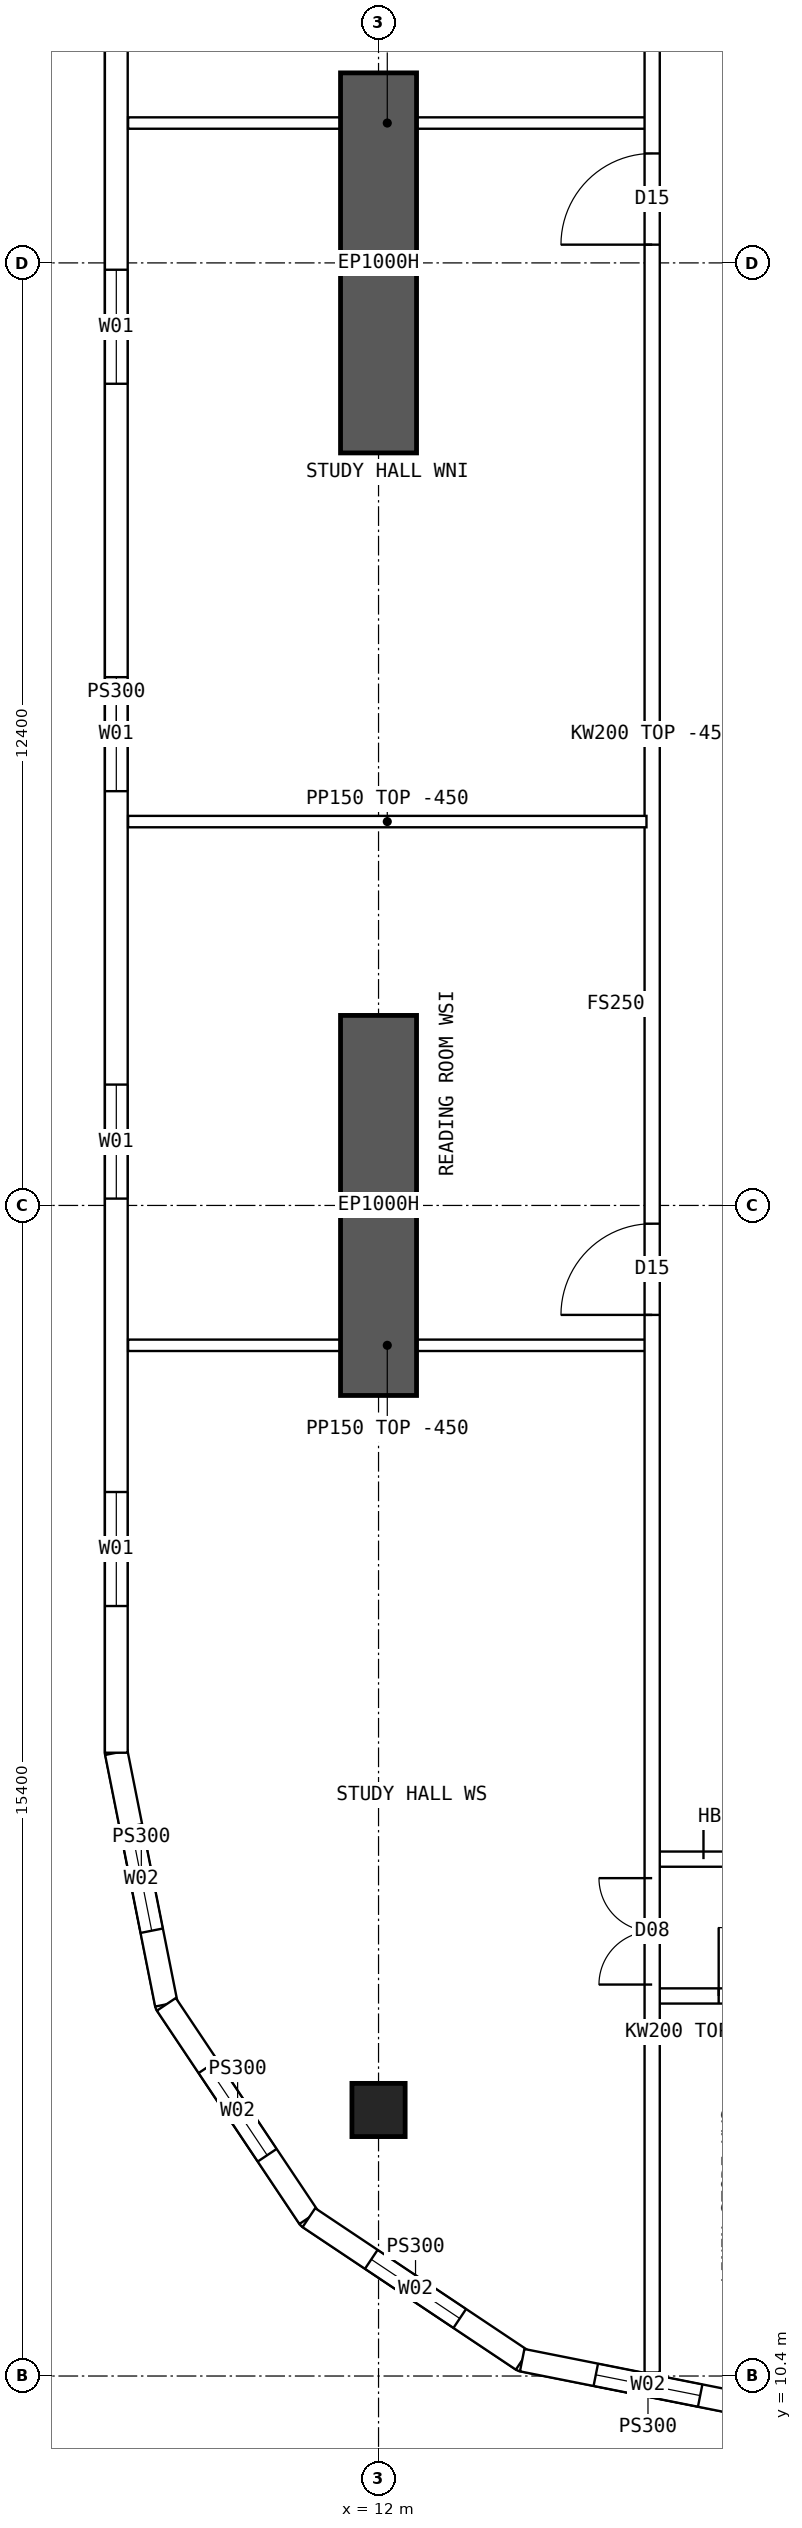
"""IFC4 building model, lengths in metres.
Left out: names, types, materials, properties, quantities, classifications, styles, units other than length and angle.
Written with IfcOpenShell. Run it as: python <this file> out.ifc"""

import sys

from ifc_helpers import new_model, si_unit, direction, frame, frame_2d, origin, origin_2d, place, context, subcontext, project, spatial, polyline, rectangle, hollow_rectangle, outline, extrude, element, fill, save


model = new_model("IFC4")
c1 = context("Model", 3, precision=1e-05, world=origin(), true_north=direction((0.0, 1.0)))
c2 = subcontext(c1, "Body", "Model", "MODEL_VIEW")
j1 = project(units=[si_unit("LENGTHUNIT", "METRE"), si_unit("PLANEANGLEUNIT", "RADIAN")], contexts=[c1])
p1 = place(None, origin())
s1 = spatial("IfcSite", under=j1, at=p1, CompositionType="ELEMENT")
p2 = place(p1, origin())
s2 = spatial("IfcBuilding", under=s1, at=p2, CompositionType="ELEMENT")
p3 = place(p2, frame((0.0, 0.0, 159.85)))
s3 = spatial("IfcBuildingStorey", under=s2, at=p3, CompositionType="ELEMENT", Elevation=159.85)
p4 = place(p3, frame((12.0, 13.9, 0.0), z_axis=(0.0, 0.0, 1.0), x_axis=(1.0, 0.0, 0.0)))
e1 = element("IfcColumn", 1, at=p4, inside=s3, PredefinedType="COLUMN", context=c2, shape_type="SweptSolid", body=[
    extrude(hollow_rectangle(XDim=0.7, YDim=0.7, WallThickness=0.07, at=origin_2d()), origin(), (0.0, 0.0, 1.0), 3.75),
])
for number, where, z_axis, x_axis in (
    (2, (12.0, 23.3, 0.0), (0.0, 0.0, 1.0), (0.0, 1.0, 0.0)),
    (3, (12.0, 35.7, 0.0), (0.0, 0.0, 1.0), (0.0, 1.0, 0.0)),
):
    element("IfcWall", number, at=place(p3, frame(where, z_axis=z_axis, x_axis=x_axis)), inside=s3, PredefinedType="SHEAR", context=c2, shape_type="SweptSolid", body=[
        extrude(rectangle(XDim=5.0, YDim=1.0, at=frame_2d((2.5, 0.0))), origin(), (0.0, 0.0, 1.0), 3.75),
    ])
p5 = place(p3, frame((8.55, 45.4, 0.0), z_axis=(0.0, 0.0, 1.0), x_axis=(0.0, -1.0, 0.0)))
e4 = element("IfcWall", 4, at=p5, inside=s3, PredefinedType="SOLIDWALL", context=c2, shape_type="SweptSolid", body=[
    extrude(outline(polyline([(-0.015, -0.15), (26.815, -0.15), (26.785, 0.15), (0.015, 0.15), (-0.015, -0.15)])), origin(), (0.0, 0.0, 1.0), 3.3),
])
p6 = place(p5, frame((1.93, 0.0, 0.9)))
e5 = element("IfcOpeningElement", 5, at=p6, cuts=e4, PredefinedType="OPENING", context=c2, shape_type="SweptSolid", body=[
    extrude(rectangle(XDim=1.5, YDim=2.0, at=frame_2d((0.75, 1.0))), frame((0.0, 0.16, 0.0), z_axis=(0.0, -1.0, 0.0), x_axis=(1.0, 0.0, 0.0)), (0.0, 0.0, 1.0), 0.32),
])
p7 = place(p5, frame((7.29, 0.0, 0.9)))
e6 = element("IfcOpeningElement", 6, at=p7, cuts=e4, PredefinedType="OPENING", context=c2, shape_type="SweptSolid", body=[
    extrude(rectangle(XDim=1.5, YDim=2.0, at=frame_2d((0.75, 1.0))), frame((0.0, 0.16, 0.0), z_axis=(0.0, -1.0, 0.0), x_axis=(1.0, 0.0, 0.0)), (0.0, 0.0, 1.0), 0.32),
])
p8 = place(p5, frame((12.65, 0.0, 0.9)))
e7 = element("IfcOpeningElement", 7, at=p8, cuts=e4, PredefinedType="OPENING", context=c2, shape_type="SweptSolid", body=[
    extrude(rectangle(XDim=1.5, YDim=2.0, at=frame_2d((0.75, 1.0))), frame((0.0, 0.16, 0.0), z_axis=(0.0, -1.0, 0.0), x_axis=(1.0, 0.0, 0.0)), (0.0, 0.0, 1.0), 0.32),
])
p9 = place(p5, frame((18.01, 0.0, 0.9)))
e8 = element("IfcOpeningElement", 8, at=p9, cuts=e4, PredefinedType="OPENING", context=c2, shape_type="SweptSolid", body=[
    extrude(rectangle(XDim=1.5, YDim=2.0, at=frame_2d((0.75, 1.0))), frame((0.0, 0.16, 0.0), z_axis=(0.0, -1.0, 0.0), x_axis=(1.0, 0.0, 0.0)), (0.0, 0.0, 1.0), 0.32),
])
p10 = place(p5, frame((23.37, 0.0, 0.9)))
e9 = element("IfcOpeningElement", 9, at=p10, cuts=e4, PredefinedType="OPENING", context=c2, shape_type="SweptSolid", body=[
    extrude(rectangle(XDim=1.5, YDim=2.0, at=frame_2d((0.75, 1.0))), frame((0.0, 0.16, 0.0), z_axis=(0.0, -1.0, 0.0), x_axis=(1.0, 0.0, 0.0)), (0.0, 0.0, 1.0), 0.32),
])
p11 = place(p3, frame((8.55, 18.6, 0.0), z_axis=(0.0, 0.0, 1.0), x_axis=(0.19508664885, -0.980786011034, 0.0)))
e10 = element("IfcWall", 10, at=p11, inside=s3, PredefinedType="SOLIDWALL", context=c2, shape_type="SweptSolid", body=[
    extrude(outline(polyline([(-0.015, -0.15), (3.405, -0.15), (3.345, 0.15), (0.015, 0.15), (-0.015, -0.15)])), origin(), (0.0, 0.0, 1.0), 3.3),
])
p12 = place(p11, frame((0.988, 0.0, 0.9)))
e11 = element("IfcOpeningElement", 11, at=p12, cuts=e10, PredefinedType="OPENING", context=c2, shape_type="SweptSolid", body=[
    extrude(rectangle(XDim=1.4, YDim=1.8, at=frame_2d((0.7, 0.9))), frame((0.0, 0.16, 0.0), z_axis=(0.0, -1.0, 0.0), x_axis=(1.0, 0.0, 0.0)), (0.0, 0.0, 1.0), 0.32),
])
p13 = place(p3, frame((9.208, 15.29, 0.0), z_axis=(0.0, 0.0, 1.0), x_axis=(0.555534554399, -0.831493450887, 0.0)))
e12 = element("IfcWall", 12, at=p13, inside=s3, PredefinedType="SOLIDWALL", context=c2, shape_type="SweptSolid", body=[
    extrude(outline(polyline([(-0.03, -0.15), (3.405, -0.15), (3.345, 0.15), (0.03, 0.15), (-0.03, -0.15)])), origin(), (0.0, 0.0, 1.0), 3.3),
])
p14 = place(p13, frame((0.988, 0.0, 0.9)))
e13 = element("IfcOpeningElement", 13, at=p14, cuts=e12, PredefinedType="OPENING", context=c2, shape_type="SweptSolid", body=[
    extrude(rectangle(XDim=1.4, YDim=1.8, at=frame_2d((0.7, 0.9))), frame((0.0, 0.16, 0.0), z_axis=(0.0, -1.0, 0.0), x_axis=(1.0, 0.0, 0.0)), (0.0, 0.0, 1.0), 0.32),
])
p15 = place(p3, frame((11.083, 12.483, 0.0), z_axis=(0.0, 0.0, 1.0), x_axis=(0.831493450887, -0.555534554399, 0.0)))
e14 = element("IfcWall", 14, at=p15, inside=s3, PredefinedType="SOLIDWALL", context=c2, shape_type="SweptSolid", body=[
    extrude(outline(polyline([(-0.03, -0.15), (3.405, -0.15), (3.345, 0.15), (0.03, 0.15), (-0.03, -0.15)])), origin(), (0.0, 0.0, 1.0), 3.3),
])
p16 = place(p15, frame((0.988, 0.0, 0.9)))
e15 = element("IfcOpeningElement", 15, at=p16, cuts=e14, PredefinedType="OPENING", context=c2, shape_type="SweptSolid", body=[
    extrude(rectangle(XDim=1.4, YDim=1.8, at=frame_2d((0.7, 0.9))), frame((0.0, 0.16, 0.0), z_axis=(0.0, -1.0, 0.0), x_axis=(1.0, 0.0, 0.0)), (0.0, 0.0, 1.0), 0.32),
])
p17 = place(p3, frame((13.89, 10.608, 0.0), z_axis=(0.0, 0.0, 1.0), x_axis=(0.98078325777, -0.195100490205, 0.0)))
e16 = element("IfcWall", 16, at=p17, inside=s3, PredefinedType="SOLIDWALL", context=c2, shape_type="SweptSolid", body=[
    extrude(outline(polyline([(-0.03, -0.15), (3.405, -0.15), (3.345, 0.15), (0.03, 0.15), (-0.03, -0.15)])), origin(), (0.0, 0.0, 1.0), 3.3),
])
p18 = place(p17, frame((0.988, 0.0, 0.9)))
e17 = element("IfcOpeningElement", 17, at=p18, cuts=e16, PredefinedType="OPENING", context=c2, shape_type="SweptSolid", body=[
    extrude(rectangle(XDim=1.4, YDim=1.8, at=frame_2d((0.7, 0.9))), frame((0.0, 0.16, 0.0), z_axis=(0.0, -1.0, 0.0), x_axis=(1.0, 0.0, 0.0)), (0.0, 0.0, 1.0), 0.32),
])
p19 = place(p3, frame((15.6, 15.4, 0.0), z_axis=(0.0, 0.0, 1.0), x_axis=(1.0, 0.0, 0.0)))
e18 = element("IfcWall", 18, at=p19, inside=s3, PredefinedType="SOLIDWALL", context=c2, shape_type="SweptSolid", body=[
    extrude(rectangle(XDim=1.975, YDim=0.2, at=frame_2d((0.987, 0.0))), origin(), (0.0, 0.0, 1.0), 3.3),
])
p20 = place(p19, frame((0.875, 0.0, 0.0)))
e19 = element("IfcOpeningElement", 19, at=p20, cuts=e18, PredefinedType="OPENING", context=c2, shape_type="SweptSolid", body=[
    extrude(rectangle(XDim=0.9, YDim=2.1, at=frame_2d((0.45, 1.05))), frame((0.0, 0.11, 0.0), z_axis=(0.0, -1.0, 0.0), x_axis=(1.0, 0.0, 0.0)), (0.0, 0.0, 1.0), 0.22),
])
p21 = place(p3, frame((15.6, 17.2, 0.0), z_axis=(0.0, 0.0, 1.0), x_axis=(1.0, 0.0, 0.0)))
e20 = element("IfcWall", 20, at=p21, inside=s3, PredefinedType="SOLIDWALL", context=c2, shape_type="SweptSolid", body=[
    extrude(rectangle(XDim=1.975, YDim=0.2, at=frame_2d((0.987, 0.0))), origin(), (0.0, 0.0, 1.0), 3.3),
])
p22 = place(p21, frame((0.675, 0.0, 0.0)))
e21 = element("IfcOpeningElement", 21, at=p22, cuts=e20, PredefinedType="OPENING", context=c2, shape_type="SweptSolid", body=[
    extrude(rectangle(XDim=1.2, YDim=2.1, at=frame_2d((0.6, 1.05))), frame((0.0, 0.11, 0.0), z_axis=(0.0, -1.0, 0.0), x_axis=(1.0, 0.0, 0.0)), (0.0, 0.0, 1.0), 0.22),
])
p23 = place(p3, frame((8.705, 30.85, 0.0), z_axis=(0.0, 0.0, 1.0), x_axis=(1.0, 0.0, 0.0)))
e22 = element("IfcWall", 22, at=p23, inside=s3, PredefinedType="PARTITIONING", context=c2, shape_type="SweptSolid", body=[
    extrude(outline(polyline([(0.0, 0.0), (6.82, 0.0), (6.82, 3.3), (3.597, 3.3), (3.595, 2.85), (2.997, 2.85), (2.995, 3.3), (0.0, 3.3), (0.0, 0.0)])), frame((0.0, 0.075, 0.0), z_axis=(0.0, -1.0, 0.0), x_axis=(1.0, 0.0, 0.0)), (0.0, 0.0, 1.0), 0.15),
])
p24 = place(p3, frame((15.6, 10.446, 0.0), z_axis=(0.0, 0.0, 1.0), x_axis=(0.0, 1.0, 0.0)))
e23 = element("IfcWall", 23, at=p24, inside=s3, PredefinedType="SOLIDWALL", context=c2, shape_type="SweptSolid", body=[
    extrude(rectangle(XDim=43.107, YDim=0.2, at=frame_2d((21.554, 0.0))), origin(), (0.0, 0.0, 1.0), 3.3),
])
p25 = place(p24, frame((13.914, 0.0, 0.0)))
e24 = element("IfcOpeningElement", 24, at=p25, cuts=e23, PredefinedType="OPENING", context=c2, shape_type="SweptSolid", body=[
    extrude(rectangle(XDim=1.2, YDim=2.1, at=frame_2d((0.6, 1.05))), frame((0.0, 0.11, 0.0), z_axis=(0.0, -1.0, 0.0), x_axis=(1.0, 0.0, 0.0)), (0.0, 0.0, 1.0), 0.22),
])
p26 = place(p24, frame((27.994, 0.0, 0.0)))
e25 = element("IfcOpeningElement", 25, at=p26, cuts=e23, PredefinedType="OPENING", context=c2, shape_type="SweptSolid", body=[
    extrude(rectangle(XDim=1.2, YDim=2.1, at=frame_2d((0.6, 1.05))), frame((0.0, 0.11, 0.0), z_axis=(0.0, -1.0, 0.0), x_axis=(1.0, 0.0, 0.0)), (0.0, 0.0, 1.0), 0.22),
])
p27 = place(p24, frame((5.104, 0.0, 0.0)))
e26 = element("IfcOpeningElement", 26, at=p27, cuts=e23, PredefinedType="OPENING", context=c2, shape_type="SweptSolid", body=[
    extrude(rectangle(XDim=1.4, YDim=2.1, at=frame_2d((0.7, 1.05))), frame((0.0, 0.11, 0.0), z_axis=(0.0, -1.0, 0.0), x_axis=(1.0, 0.0, 0.0)), (0.0, 0.0, 1.0), 0.22),
])
p28 = place(p24, frame((36.504, 0.0, 0.0)))
e27 = element("IfcOpeningElement", 27, at=p28, cuts=e23, PredefinedType="OPENING", context=c2, shape_type="SweptSolid", body=[
    extrude(rectangle(XDim=1.4, YDim=2.1, at=frame_2d((0.7, 1.05))), frame((0.0, 0.11, 0.0), z_axis=(0.0, -1.0, 0.0), x_axis=(1.0, 0.0, 0.0)), (0.0, 0.0, 1.0), 0.22),
])
for number, where, z_axis, x_axis in (
    (28, (8.705, 23.96, 0.0), (0.0, 0.0, 1.0), (1.0, 0.0, 0.0)),
    (29, (8.705, 40.04, 0.0), (0.0, 0.0, 1.0), (1.0, 0.0, 0.0)),
):
    element("IfcWall", number, at=place(p3, frame(where, z_axis=z_axis, x_axis=x_axis)), inside=s3, PredefinedType="PARTITIONING", context=c2, shape_type="SweptSolid", body=[
        extrude(rectangle(XDim=6.82, YDim=0.15, at=frame_2d((3.41, 0.0))), origin(), (0.0, 0.0, 1.0), 3.3),
    ])
p29 = place(p7, origin())
e30 = element("IfcWindow", 30, at=p29, inside=s3, PartitioningType="SINGLE_PANEL", PredefinedType="WINDOW", context=c2, shape_type="SweptSolid", body=[
    extrude(rectangle(XDim=1.5, YDim=2.0, at=frame_2d((0.75, 1.0))), frame((0.0, 0.03, 0.0), z_axis=(0.0, -1.0, 0.0), x_axis=(1.0, 0.0, 0.0)), (0.0, 0.0, 1.0), 0.06),
])
fill(e6, e30)
p30 = place(p8, origin())
e31 = element("IfcWindow", 31, at=p30, inside=s3, PartitioningType="SINGLE_PANEL", PredefinedType="WINDOW", context=c2, shape_type="SweptSolid", body=[
    extrude(rectangle(XDim=1.5, YDim=2.0, at=frame_2d((0.75, 1.0))), frame((0.0, 0.03, 0.0), z_axis=(0.0, -1.0, 0.0), x_axis=(1.0, 0.0, 0.0)), (0.0, 0.0, 1.0), 0.06),
])
fill(e7, e31)
p31 = place(p9, origin())
e32 = element("IfcWindow", 32, at=p31, inside=s3, PartitioningType="SINGLE_PANEL", PredefinedType="WINDOW", context=c2, shape_type="SweptSolid", body=[
    extrude(rectangle(XDim=1.5, YDim=2.0, at=frame_2d((0.75, 1.0))), frame((0.0, 0.03, 0.0), z_axis=(0.0, -1.0, 0.0), x_axis=(1.0, 0.0, 0.0)), (0.0, 0.0, 1.0), 0.06),
])
fill(e8, e32)
p32 = place(p10, origin())
e33 = element("IfcWindow", 33, at=p32, inside=s3, PartitioningType="SINGLE_PANEL", PredefinedType="WINDOW", context=c2, shape_type="SweptSolid", body=[
    extrude(rectangle(XDim=1.5, YDim=2.0, at=frame_2d((0.75, 1.0))), frame((0.0, 0.03, 0.0), z_axis=(0.0, -1.0, 0.0), x_axis=(1.0, 0.0, 0.0)), (0.0, 0.0, 1.0), 0.06),
])
fill(e9, e33)
p33 = place(p12, origin())
e34 = element("IfcWindow", 34, at=p33, inside=s3, PartitioningType="SINGLE_PANEL", PredefinedType="WINDOW", context=c2, shape_type="SweptSolid", body=[
    extrude(rectangle(XDim=1.4, YDim=1.8, at=frame_2d((0.7, 0.9))), frame((0.0, 0.03, 0.0), z_axis=(0.0, -1.0, 0.0), x_axis=(1.0, 0.0, 0.0)), (0.0, 0.0, 1.0), 0.06),
])
fill(e11, e34)
p34 = place(p14, origin())
e35 = element("IfcWindow", 35, at=p34, inside=s3, PartitioningType="SINGLE_PANEL", PredefinedType="WINDOW", context=c2, shape_type="SweptSolid", body=[
    extrude(rectangle(XDim=1.4, YDim=1.8, at=frame_2d((0.7, 0.9))), frame((0.0, 0.03, 0.0), z_axis=(0.0, -1.0, 0.0), x_axis=(1.0, 0.0, 0.0)), (0.0, 0.0, 1.0), 0.06),
])
fill(e13, e35)
p35 = place(p16, origin())
e36 = element("IfcWindow", 36, at=p35, inside=s3, PartitioningType="SINGLE_PANEL", PredefinedType="WINDOW", context=c2, shape_type="SweptSolid", body=[
    extrude(rectangle(XDim=1.4, YDim=1.8, at=frame_2d((0.7, 0.9))), frame((0.0, 0.03, 0.0), z_axis=(0.0, -1.0, 0.0), x_axis=(1.0, 0.0, 0.0)), (0.0, 0.0, 1.0), 0.06),
])
fill(e15, e36)
p36 = place(p18, origin())
e37 = element("IfcWindow", 37, at=p36, inside=s3, PartitioningType="SINGLE_PANEL", PredefinedType="WINDOW", context=c2, shape_type="SweptSolid", body=[
    extrude(rectangle(XDim=1.4, YDim=1.8, at=frame_2d((0.7, 0.9))), frame((0.0, 0.03, 0.0), z_axis=(0.0, -1.0, 0.0), x_axis=(1.0, 0.0, 0.0)), (0.0, 0.0, 1.0), 0.06),
])
fill(e17, e37)
p37 = place(p22, origin())
e38 = element("IfcDoor", 38, at=p37, inside=s3, OperationType="DOUBLE_DOOR_SINGLE_SWING", PredefinedType="DOOR", context=c2, shape_type="SweptSolid", body=[
    extrude(rectangle(XDim=1.2, YDim=2.1, at=frame_2d((0.6, 1.05))), frame((0.0, 0.025, 0.0), z_axis=(0.0, -1.0, 0.0), x_axis=(1.0, 0.0, 0.0)), (0.0, 0.0, 1.0), 0.05),
])
fill(e21, e38)
p38 = place(p25, origin())
e39 = element("IfcDoor", 39, at=p38, inside=s3, OperationType="SINGLE_SWING_LEFT", PredefinedType="DOOR", context=c2, shape_type="SweptSolid", body=[
    extrude(rectangle(XDim=1.2, YDim=2.1, at=frame_2d((0.6, 1.05))), frame((0.0, 0.025, 0.0), z_axis=(0.0, -1.0, 0.0), x_axis=(1.0, 0.0, 0.0)), (0.0, 0.0, 1.0), 0.05),
])
fill(e24, e39)
p39 = place(p26, origin())
e40 = element("IfcDoor", 40, at=p39, inside=s3, OperationType="SINGLE_SWING_LEFT", PredefinedType="DOOR", context=c2, shape_type="SweptSolid", body=[
    extrude(rectangle(XDim=1.2, YDim=2.1, at=frame_2d((0.6, 1.05))), frame((0.0, 0.025, 0.0), z_axis=(0.0, -1.0, 0.0), x_axis=(1.0, 0.0, 0.0)), (0.0, 0.0, 1.0), 0.05),
])
fill(e25, e40)
p40 = place(p27, origin())
e41 = element("IfcDoor", 41, at=p40, inside=s3, OperationType="DOUBLE_DOOR_SINGLE_SWING", PredefinedType="DOOR", context=c2, shape_type="SweptSolid", body=[
    extrude(rectangle(XDim=1.4, YDim=2.1, at=frame_2d((0.7, 1.05))), frame((0.0, 0.025, 0.0), z_axis=(0.0, -1.0, 0.0), x_axis=(1.0, 0.0, 0.0)), (0.0, 0.0, 1.0), 0.05),
])
fill(e26, e41)
p41 = place(p20, origin())
e42 = element("IfcDoor", 42, at=p41, inside=s3, OperationType="SINGLE_SWING_LEFT", PredefinedType="DOOR", context=c2, shape_type="SweptSolid", body=[
    extrude(rectangle(XDim=0.9, YDim=2.1, at=frame_2d((0.45, 1.05))), frame((0.0, 0.025, 0.0), z_axis=(0.0, -1.0, 0.0), x_axis=(1.0, 0.0, 0.0)), (0.0, 0.0, 1.0), 0.05),
])
fill(e19, e42)
save(model, sys.argv[1])
